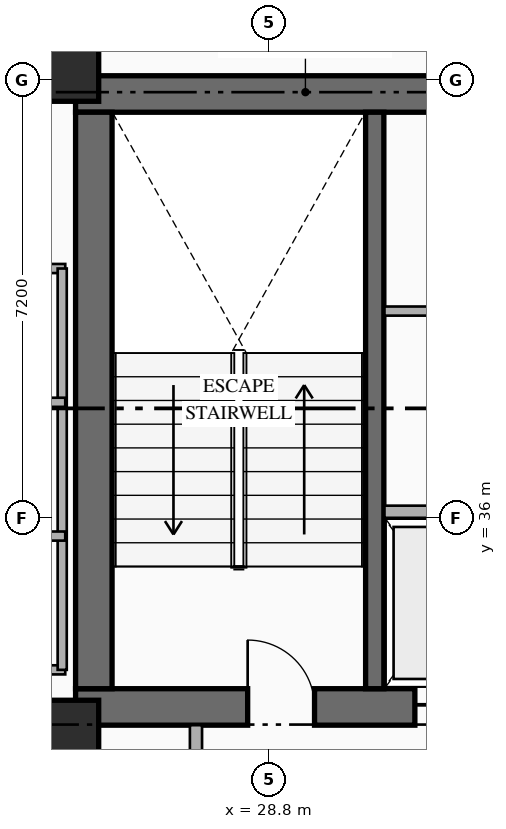
"""IFC4 building model, lengths in metres.
Left out: names, types, materials, properties, quantities, classifications, styles, units other than length and angle.
Written with IfcOpenShell. Run it as: python <this file> out.ifc"""

import sys

from ifc_helpers import new_model, si_unit, direction, frame, frame_2d, origin, origin_2d, place, context, subcontext, project, spatial, rectangle, extrude, element, fill, save


model = new_model("IFC4")
c1 = context("Model", 3, precision=1e-05, world=origin(), true_north=direction((0.0, 1.0)))
c2 = subcontext(c1, "Body", "Model", "MODEL_VIEW")
j1 = project(units=[si_unit("LENGTHUNIT", "METRE"), si_unit("PLANEANGLEUNIT", "RADIAN")], contexts=[c1])
p1 = place(None, origin())
s1 = spatial("IfcSite", under=j1, at=p1, CompositionType="ELEMENT")
p2 = place(p1, origin())
s2 = spatial("IfcBuilding", under=s1, at=p2, CompositionType="ELEMENT")
p3 = place(p2, frame((0.0, 0.0, 112.05)))
s3 = spatial("IfcBuildingStorey", under=s2, at=p3, CompositionType="ELEMENT", Elevation=112.05)
p4 = place(p3, frame((25.62, 32.89, 0.0), z_axis=(0.0, 0.0, 1.0), x_axis=(1.0, 0.0, 0.0)))
e1 = element("IfcWall", 1, at=p4, inside=s3, PredefinedType="SHEAR", context=c2, shape_type="SweptSolid", body=[
    extrude(rectangle(XDim=7.78, YDim=0.6, at=frame_2d((3.89, 0.0))), origin(), (0.0, 0.0, 1.0), 3.6),
])
p5 = place(p4, frame((2.83, 0.0, 0.0)))
e2 = element("IfcOpeningElement", 2, at=p5, cuts=e1, PredefinedType="OPENING", context=c2, shape_type="SweptSolid", body=[
    extrude(rectangle(XDim=1.1, YDim=2.2, at=frame_2d((0.55, 1.1))), frame((0.0, 0.31, 0.0), z_axis=(0.0, -1.0, 0.0), x_axis=(1.0, 0.0, 0.0)), (0.0, 0.0, 1.0), 0.62),
])
p6 = place(p4, frame((5.58, 0.0, 0.0)))
e3 = element("IfcOpeningElement", 3, at=p6, cuts=e1, PredefinedType="OPENING", context=c2, shape_type="SweptSolid", body=[
    extrude(rectangle(XDim=1.1, YDim=2.15, at=frame_2d((0.55, 1.075))), frame((0.0, 0.31, 0.0), z_axis=(0.0, -1.0, 0.0), x_axis=(1.0, 0.0, 0.0)), (0.0, 0.0, 1.0), 0.62),
])
p7 = place(p3, frame((25.62, 42.97, 0.0), z_axis=(0.0, 0.0, 1.0), x_axis=(1.0, 0.0, 0.0)))
e4 = element("IfcWall", 4, at=p7, inside=s3, PredefinedType="SHEAR", context=c2, shape_type="SweptSolid", body=[
    extrude(rectangle(XDim=7.78, YDim=0.6, at=frame_2d((3.89, 0.0))), origin(), (0.0, 0.0, 1.0), 3.6),
])
p8 = place(p3, frame((25.92, 33.19, 0.0), z_axis=(0.0, 0.0, 1.0), x_axis=(0.0, 1.0, 0.0)))
e5 = element("IfcWall", 5, at=p8, inside=s3, PredefinedType="SHEAR", context=c2, shape_type="SweptSolid", body=[
    extrude(rectangle(XDim=9.48, YDim=0.6, at=frame_2d((4.74, 0.0))), origin(), (0.0, 0.0, 1.0), 3.6),
])
p9 = place(p3, frame((30.54, 33.19, 0.0), z_axis=(0.0, 0.0, 1.0), x_axis=(0.0, 1.0, 0.0)))
e6 = element("IfcWall", 6, at=p9, inside=s3, PredefinedType="SHEAR", context=c2, shape_type="SweptSolid", body=[
    extrude(rectangle(XDim=9.48, YDim=0.3, at=frame_2d((4.74, 0.0))), origin(), (0.0, 0.0, 1.0), 3.6),
])
for number, where, z_axis, x_axis in (
    (7, (25.55, 32.55, 0.0), (0.0, 0.0, 1.0), (1.0, 0.0, 0.0)),
    (8, (25.55, 43.3, 0.0), (0.0, 0.0, 1.0), (1.0, 0.0, 0.0)),
):
    element("IfcColumn", number, at=place(p3, frame(where, z_axis=z_axis, x_axis=x_axis)), inside=s3, PredefinedType="COLUMN", context=c2, shape_type="SweptSolid", body=[
        extrude(rectangle(XDim=0.9, YDim=0.9, at=origin_2d()), origin(), (0.0, 0.0, 1.0), 3.6),
    ])
p10 = place(p3, frame((30.7, 36.1, 0.0), z_axis=(0.0, 0.0, 1.0), x_axis=(1.0, 0.0, 0.0)))
e9 = element("IfcWall", 9, at=p10, inside=s3, PredefinedType="STANDARD", context=c2, shape_type="SweptSolid", body=[
    extrude(rectangle(XDim=2.1, YDim=0.2, at=frame_2d((1.05, 0.0))), origin(), (0.0, 0.0, 1.0), 3.35),
])
p11 = place(p3, frame((30.7, 39.4, 0.0), z_axis=(0.0, 0.0, 1.0), x_axis=(1.0, 0.0, 0.0)))
e10 = element("IfcWall", 10, at=p11, inside=s3, PredefinedType="PARTITIONING", context=c2, shape_type="SweptSolid", body=[
    extrude(rectangle(XDim=2.1, YDim=0.15, at=frame_2d((1.05, 0.0))), origin(), (0.0, 0.0, 1.0), 3.35),
])
p12 = place(p3, frame((27.6, 29.2, 0.0), z_axis=(0.0, 0.0, 1.0), x_axis=(0.0, 1.0, 0.0)))
e11 = element("IfcWall", 11, at=p12, inside=s3, PredefinedType="STANDARD", context=c2, shape_type="SweptSolid", body=[
    extrude(rectangle(XDim=3.39, YDim=0.2, at=frame_2d((1.695, 0.0))), origin(), (0.0, 0.0, 1.0), 3.35),
])
for number, where, z_axis, x_axis in (
    (12, (22.15, 33.5, 0.0), (0.0, 0.0, 1.0), (1.0, 0.0, 0.0)),
    (13, (22.15, 40.1, 0.0), (0.0, 0.0, 1.0), (1.0, 0.0, 0.0)),
):
    element("IfcWall", number, at=place(p3, frame(where, z_axis=z_axis, x_axis=x_axis)), inside=s3, PredefinedType="PARTITIONING", context=c2, shape_type="SweptSolid", body=[
        extrude(rectangle(XDim=3.3, YDim=0.15, at=frame_2d((1.65, 0.0))), origin(), (0.0, 0.0, 1.0), 3.35),
    ])
p13 = place(p3, frame((25.4, 33.5, 0.0), z_axis=(0.0, 0.0, 1.0), x_axis=(0.0, 1.0, 0.0)))
e14 = element("IfcWall", 14, at=p13, inside=s3, PredefinedType="PARTITIONING", context=c2, shape_type="SweptSolid", body=[
    extrude(rectangle(XDim=6.6, YDim=0.15, at=frame_2d((3.3, 0.0))), origin(), (0.0, 0.0, 1.0), 3.35),
])
for number, where, z_axis, x_axis in (
    (15, (22.15, 35.7, 0.0), (0.0, 0.0, 1.0), (1.0, 0.0, 0.0)),
    (16, (22.15, 37.9, 0.0), (0.0, 0.0, 1.0), (1.0, 0.0, 0.0)),
):
    element("IfcWall", number, at=place(p3, frame(where, z_axis=z_axis, x_axis=x_axis)), inside=s3, PredefinedType="PARTITIONING", context=c2, shape_type="SweptSolid", body=[
        extrude(rectangle(XDim=3.3, YDim=0.15, at=frame_2d((1.65, 0.0))), origin(), (0.0, 0.0, 1.0), 3.35),
    ])
p14 = place(p5, origin())
e17 = element("IfcDoor", 17, at=p14, inside=s3, OperationType="SINGLE_SWING_LEFT", PredefinedType="DOOR", context=c2, shape_type="SweptSolid", body=[
    extrude(rectangle(XDim=1.1, YDim=2.2, at=frame_2d((0.55, 1.1))), frame((0.0, 0.025, 0.0), z_axis=(0.0, -1.0, 0.0), x_axis=(1.0, 0.0, 0.0)), (0.0, 0.0, 1.0), 0.05),
])
fill(e2, e17)
p15 = place(p6, origin())
e18 = element("IfcDoor", 18, at=p15, inside=s3, OperationType="SLIDING_TO_LEFT", PredefinedType="USERDEFINED", context=c2, shape_type="SweptSolid", body=[
    extrude(rectangle(XDim=1.1, YDim=2.15, at=frame_2d((0.55, 1.075))), frame((0.0, 0.025, 0.0), z_axis=(0.0, -1.0, 0.0), x_axis=(1.0, 0.0, 0.0)), (0.0, 0.0, 1.0), 0.05),
])
fill(e3, e18)
save(model, sys.argv[1])
